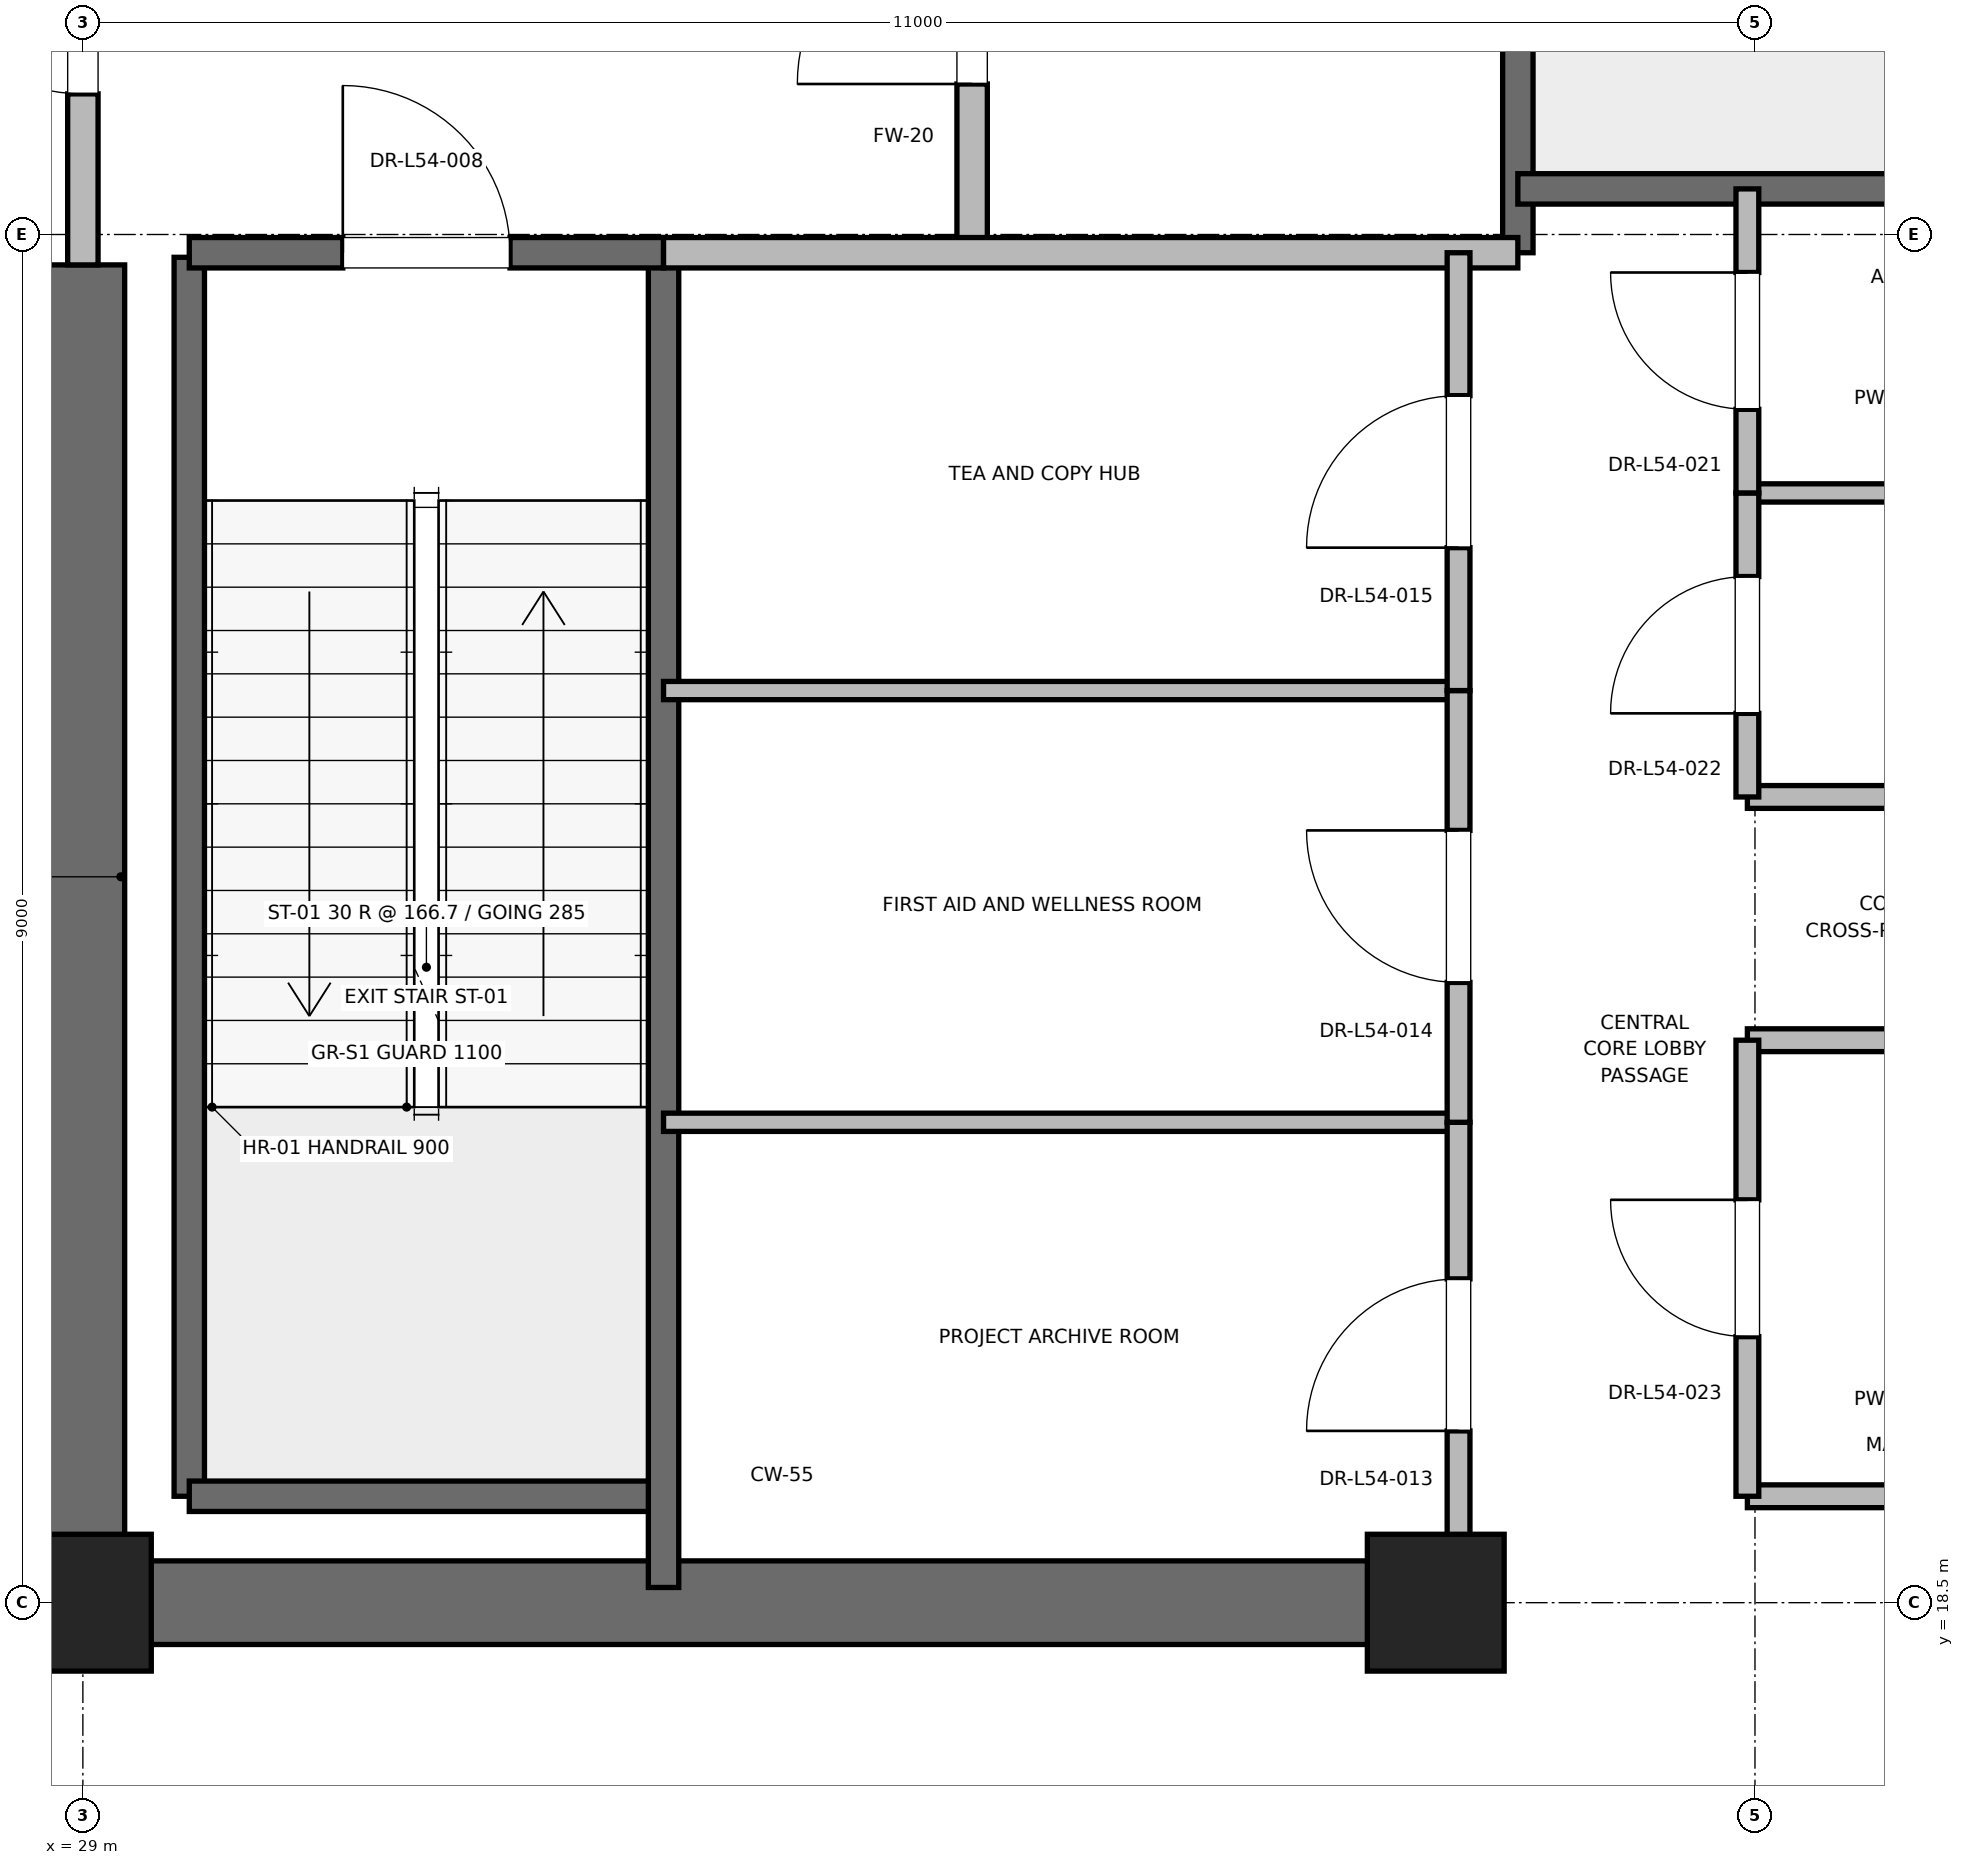
"""IFC4 building model, lengths in metres.
Left out: names, types, materials, properties, quantities, classifications, styles, units other than length and angle.
Written with IfcOpenShell. Run it as: python <this file> out.ifc"""

import sys

from ifc_helpers import new_model, si_unit, direction, frame, frame_2d, origin, origin_2d, place, context, subcontext, project, spatial, rectangle, extrude, element, fill, save


model = new_model("IFC4")
c1 = context("Model", 3, precision=1e-05, world=origin(), true_north=direction((0.0, 1.0)))
c2 = subcontext(c1, "Body", "Model", "MODEL_VIEW")
j1 = project(units=[si_unit("LENGTHUNIT", "METRE"), si_unit("PLANEANGLEUNIT", "RADIAN")], contexts=[c1])
p1 = place(None, origin())
s1 = spatial("IfcSite", under=j1, at=p1, CompositionType="ELEMENT")
p2 = place(p1, origin())
s2 = spatial("IfcBuilding", under=s1, at=p2, CompositionType="ELEMENT")
p3 = place(p2, frame((0.0, 0.0, 233.2)))
s3 = spatial("IfcBuildingStorey", under=s2, at=p3, CompositionType="ELEMENT", Elevation=233.2)
for number, where, z_axis, x_axis in (
    (1, (29.0, 18.5, 0.0), (0.0, 0.0, 1.0), (1.0, 0.0, 0.0)),
    (2, (37.9, 18.5, 0.0), (0.0, 0.0, 1.0), (1.0, 0.0, 0.0)),
):
    element("IfcColumn", number, at=place(p3, frame(where, z_axis=z_axis, x_axis=x_axis)), inside=s3, PredefinedType="PILASTER", context=c2, shape_type="SweptSolid", body=[
        extrude(rectangle(XDim=0.9, YDim=0.9, at=origin_2d()), origin(), (0.0, 0.0, 1.0), 5.0),
    ])
p4 = place(p3, frame((29.0, 18.5, 0.0), z_axis=(0.0, 0.0, 1.0), x_axis=(1.0, 0.0, 0.0)))
e3 = element("IfcWall", 3, at=p4, inside=s3, PredefinedType="SHEAR", context=c2, shape_type="SweptSolid", body=[
    extrude(rectangle(XDim=9.2, YDim=0.55, at=frame_2d((4.6, 0.0))), origin(), (0.0, 0.0, 1.0), 4.7),
])
p5 = place(p3, frame((29.0, 18.5, 0.0), z_axis=(0.0, 0.0, 1.0), x_axis=(0.0, 1.0, 0.0)))
e4 = element("IfcWall", 4, at=p5, inside=s3, PredefinedType="SHEAR", context=c2, shape_type="SweptSolid", body=[
    extrude(rectangle(XDim=8.8, YDim=0.55, at=frame_2d((4.4, 0.0))), origin(), (0.0, 0.0, 1.0), 4.7),
])
p6 = place(p3, frame((29.7, 19.2, 0.0), z_axis=(0.0, 0.0, 1.0), x_axis=(0.0, 1.0, 0.0)))
e5 = element("IfcWall", 5, at=p6, inside=s3, PredefinedType="SOLIDWALL", context=c2, shape_type="SweptSolid", body=[
    extrude(rectangle(XDim=8.15, YDim=0.2, at=frame_2d((4.075, 0.0))), origin(), (0.0, 0.0, 1.0), 4.7),
])
p7 = place(p3, frame((29.7, 19.2, 0.0), z_axis=(0.0, 0.0, 1.0), x_axis=(1.0, 0.0, 0.0)))
e6 = element("IfcWall", 6, at=p7, inside=s3, PredefinedType="SOLIDWALL", context=c2, shape_type="SweptSolid", body=[
    extrude(rectangle(XDim=3.12, YDim=0.2, at=frame_2d((1.56, 0.0))), origin(), (0.0, 0.0, 1.0), 4.7),
])
p8 = place(p3, frame((32.82, 18.6, 0.0), z_axis=(0.0, 0.0, 1.0), x_axis=(0.0, 1.0, 0.0)))
e7 = element("IfcWall", 7, at=p8, inside=s3, PredefinedType="SOLIDWALL", context=c2, shape_type="SweptSolid", body=[
    extrude(rectangle(XDim=8.78, YDim=0.2, at=frame_2d((4.39, 0.0))), origin(), (0.0, 0.0, 1.0), 4.7),
])
p9 = place(p3, frame((29.7, 27.38, 0.0), z_axis=(0.0, 0.0, 1.0), x_axis=(1.0, 0.0, 0.0)))
e8 = element("IfcWall", 8, at=p9, inside=s3, PredefinedType="SOLIDWALL", context=c2, shape_type="SweptSolid", body=[
    extrude(rectangle(XDim=3.12, YDim=0.2, at=frame_2d((1.56, 0.0))), origin(), (0.0, 0.0, 1.0), 4.7),
])
p10 = place(p9, frame((1.01, 0.0, 0.0)))
e9 = element("IfcOpeningElement", 9, at=p10, cuts=e8, PredefinedType="OPENING", context=c2, shape_type="SweptSolid", body=[
    extrude(rectangle(XDim=1.1, YDim=2.15, at=frame_2d((0.55, 1.075))), frame((0.0, 0.1, 0.0), z_axis=(0.0, -1.0, 0.0), x_axis=(1.0, 0.0, 0.0)), (0.0, 0.0, 1.0), 0.2),
])
p11 = place(p3, frame((38.44, 27.38, 0.0), z_axis=(0.0, 0.0, 1.0), x_axis=(0.0, 1.0, 0.0)))
e10 = element("IfcWall", 10, at=p11, inside=s3, PredefinedType="SOLIDWALL", context=c2, shape_type="SweptSolid", body=[
    extrude(rectangle(XDim=8.87, YDim=0.2, at=frame_2d((4.435, 0.0))), origin(), (0.0, 0.0, 1.0), 4.7),
])
p12 = place(p3, frame((38.44, 27.8, 0.0), z_axis=(0.0, 0.0, 1.0), x_axis=(1.0, 0.0, 0.0)))
e11 = element("IfcWall", 11, at=p12, inside=s3, PredefinedType="SOLIDWALL", context=c2, shape_type="SweptSolid", body=[
    extrude(rectangle(XDim=3.32, YDim=0.2, at=frame_2d((1.66, 0.0))), origin(), (0.0, 0.0, 1.0), 4.7),
])
p13 = place(p3, frame((34.85, 27.38, 0.0), z_axis=(0.0, 0.0, 1.0), x_axis=(0.0, 1.0, 0.0)))
e12 = element("IfcWall", 12, at=p13, inside=s3, PredefinedType="PARTITIONING", context=c2, shape_type="SweptSolid", body=[
    extrude(rectangle(XDim=3.37, YDim=0.2, at=frame_2d((1.685, 0.0))), origin(), (0.0, 0.0, 1.0), 4.7),
])
p14 = place(p13, frame((1.11, 0.0, 0.0)))
e13 = element("IfcOpeningElement", 13, at=p14, cuts=e12, PredefinedType="OPENING", context=c2, shape_type="SweptSolid", body=[
    extrude(rectangle(XDim=1.15, YDim=2.2, at=frame_2d((0.575, 1.1))), frame((0.0, 0.1, 0.0), z_axis=(0.0, -1.0, 0.0), x_axis=(1.0, 0.0, 0.0)), (0.0, 0.0, 1.0), 0.2),
])
p15 = place(p3, frame((29.0, 27.3, 0.0), z_axis=(0.0, 0.0, 1.0), x_axis=(0.0, 1.0, 0.0)))
e14 = element("IfcWall", 14, at=p15, inside=s3, PredefinedType="PARTITIONING", context=c2, shape_type="SweptSolid", body=[
    extrude(rectangle(XDim=3.4, YDim=0.2, at=frame_2d((1.7, 0.0))), origin(), (0.0, 0.0, 1.0), 3.68),
])
p16 = place(p15, frame((1.125, 0.0, 0.0)))
e15 = element("IfcOpeningElement", 15, at=p16, cuts=e14, PredefinedType="OPENING", context=c2, shape_type="SweptSolid", body=[
    extrude(rectangle(XDim=1.15, YDim=2.2, at=frame_2d((0.575, 1.1))), frame((0.0, 0.1, 0.0), z_axis=(0.0, -1.0, 0.0), x_axis=(1.0, 0.0, 0.0)), (0.0, 0.0, 1.0), 0.2),
])
p17 = place(p3, frame((32.82, 27.38, 0.0), z_axis=(0.0, 0.0, 1.0), x_axis=(1.0, 0.0, 0.0)))
e16 = element("IfcWall", 16, at=p17, inside=s3, PredefinedType="PARTITIONING", context=c2, shape_type="SweptSolid", body=[
    extrude(rectangle(XDim=5.62, YDim=0.2, at=frame_2d((2.81, 0.0))), origin(), (0.0, 0.0, 1.0), 4.7),
])
for number, where, z_axis, x_axis in (
    (17, (39.95, 19.2, 0.0), (0.0, 0.0, 1.0), (1.0, 0.0, 0.0)),
    (18, (39.95, 22.2, 0.0), (0.0, 0.0, 1.0), (1.0, 0.0, 0.0)),
    (19, (39.95, 23.8, 0.0), (0.0, 0.0, 1.0), (1.0, 0.0, 0.0)),
):
    element("IfcWall", number, at=place(p3, frame(where, z_axis=z_axis, x_axis=x_axis)), inside=s3, PredefinedType="PARTITIONING", context=c2, shape_type="SweptSolid", body=[
        extrude(rectangle(XDim=1.81, YDim=0.15, at=frame_2d((0.905, 0.0))), origin(), (0.0, 0.0, 1.0), 2.85),
    ])
p18 = place(p3, frame((39.95, 25.8, 0.0), z_axis=(0.0, 0.0, 1.0), x_axis=(1.0, 0.0, 0.0)))
e20 = element("IfcWall", 20, at=p18, inside=s3, PredefinedType="PARTITIONING", context=c2, shape_type="SweptSolid", body=[
    extrude(rectangle(XDim=1.81, YDim=0.12, at=frame_2d((0.905, 0.0))), origin(), (0.0, 0.0, 1.0), 2.85),
])
p19 = place(p3, frame((39.95, 19.2, 0.0), z_axis=(0.0, 0.0, 1.0), x_axis=(0.0, 1.0, 0.0)))
e21 = element("IfcWall", 21, at=p19, inside=s3, PredefinedType="PARTITIONING", context=c2, shape_type="SweptSolid", body=[
    extrude(rectangle(XDim=3.0, YDim=0.15, at=frame_2d((1.5, 0.0))), origin(), (0.0, 0.0, 1.0), 2.85),
])
p20 = place(p19, frame((1.05, 0.0, 0.0)))
e22 = element("IfcOpeningElement", 22, at=p20, cuts=e21, PredefinedType="OPENING", context=c2, shape_type="SweptSolid", body=[
    extrude(rectangle(XDim=0.9, YDim=2.1, at=frame_2d((0.45, 1.05))), frame((0.0, 0.075, 0.0), z_axis=(0.0, -1.0, 0.0), x_axis=(1.0, 0.0, 0.0)), (0.0, 0.0, 1.0), 0.15),
])
p21 = place(p3, frame((39.95, 23.8, 0.0), z_axis=(0.0, 0.0, 1.0), x_axis=(0.0, 1.0, 0.0)))
e23 = element("IfcWall", 23, at=p21, inside=s3, PredefinedType="PARTITIONING", context=c2, shape_type="SweptSolid", body=[
    extrude(rectangle(XDim=2.0, YDim=0.15, at=frame_2d((1.0, 0.0))), origin(), (0.0, 0.0, 1.0), 2.85),
])
p22 = place(p21, frame((0.55, 0.0, 0.0)))
e24 = element("IfcOpeningElement", 24, at=p22, cuts=e23, PredefinedType="OPENING", context=c2, shape_type="SweptSolid", body=[
    extrude(rectangle(XDim=0.9, YDim=2.1, at=frame_2d((0.45, 1.05))), frame((0.0, 0.075, 0.0), z_axis=(0.0, -1.0, 0.0), x_axis=(1.0, 0.0, 0.0)), (0.0, 0.0, 1.0), 0.15),
])
p23 = place(p3, frame((39.95, 25.8, 0.0), z_axis=(0.0, 0.0, 1.0), x_axis=(0.0, 1.0, 0.0)))
e25 = element("IfcWall", 25, at=p23, inside=s3, PredefinedType="PARTITIONING", context=c2, shape_type="SweptSolid", body=[
    extrude(rectangle(XDim=2.0, YDim=0.15, at=frame_2d((1.0, 0.0))), origin(), (0.0, 0.0, 1.0), 2.85),
])
p24 = place(p23, frame((0.55, 0.0, 0.0)))
e26 = element("IfcOpeningElement", 26, at=p24, cuts=e25, PredefinedType="OPENING", context=c2, shape_type="SweptSolid", body=[
    extrude(rectangle(XDim=0.9, YDim=2.1, at=frame_2d((0.45, 1.05))), frame((0.0, 0.075, 0.0), z_axis=(0.0, -1.0, 0.0), x_axis=(1.0, 0.0, 0.0)), (0.0, 0.0, 1.0), 0.15),
])
for number, where, z_axis, x_axis in (
    (27, (32.82, 21.66, 0.0), (0.0, 0.0, 1.0), (1.0, 0.0, 0.0)),
    (28, (32.82, 24.5, 0.0), (0.0, 0.0, 1.0), (1.0, 0.0, 0.0)),
):
    element("IfcWall", number, at=place(p3, frame(where, z_axis=z_axis, x_axis=x_axis)), inside=s3, PredefinedType="PARTITIONING", context=c2, shape_type="SweptSolid", body=[
        extrude(rectangle(XDim=5.23, YDim=0.12, at=frame_2d((2.615, 0.0))), origin(), (0.0, 0.0, 1.0), 2.85),
    ])
p25 = place(p3, frame((38.05, 18.6, 0.0), z_axis=(0.0, 0.0, 1.0), x_axis=(0.0, 1.0, 0.0)))
e29 = element("IfcWall", 29, at=p25, inside=s3, PredefinedType="PARTITIONING", context=c2, shape_type="SweptSolid", body=[
    extrude(rectangle(XDim=3.06, YDim=0.15, at=frame_2d((1.53, 0.0))), origin(), (0.0, 0.0, 1.0), 2.85),
])
p26 = place(p25, frame((1.03, 0.0, 0.0)))
e30 = element("IfcOpeningElement", 30, at=p26, cuts=e29, PredefinedType="OPENING", context=c2, shape_type="SweptSolid", body=[
    extrude(rectangle(XDim=1.0, YDim=2.15, at=frame_2d((0.5, 1.075))), frame((0.0, 0.075, 0.0), z_axis=(0.0, -1.0, 0.0), x_axis=(1.0, 0.0, 0.0)), (0.0, 0.0, 1.0), 0.15),
])
p27 = place(p3, frame((38.05, 21.66, 0.0), z_axis=(0.0, 0.0, 1.0), x_axis=(0.0, 1.0, 0.0)))
e31 = element("IfcWall", 31, at=p27, inside=s3, PredefinedType="PARTITIONING", context=c2, shape_type="SweptSolid", body=[
    extrude(rectangle(XDim=2.84, YDim=0.15, at=frame_2d((1.42, 0.0))), origin(), (0.0, 0.0, 1.0), 2.85),
])
p28 = place(p27, frame((0.92, 0.0, 0.0)))
e32 = element("IfcOpeningElement", 32, at=p28, cuts=e31, PredefinedType="OPENING", context=c2, shape_type="SweptSolid", body=[
    extrude(rectangle(XDim=1.0, YDim=2.15, at=frame_2d((0.5, 1.075))), frame((0.0, 0.075, 0.0), z_axis=(0.0, -1.0, 0.0), x_axis=(1.0, 0.0, 0.0)), (0.0, 0.0, 1.0), 0.15),
])
p29 = place(p3, frame((38.05, 24.5, 0.0), z_axis=(0.0, 0.0, 1.0), x_axis=(0.0, 1.0, 0.0)))
e33 = element("IfcWall", 33, at=p29, inside=s3, PredefinedType="PARTITIONING", context=c2, shape_type="SweptSolid", body=[
    extrude(rectangle(XDim=2.88, YDim=0.15, at=frame_2d((1.44, 0.0))), origin(), (0.0, 0.0, 1.0), 2.85),
])
p30 = place(p29, frame((0.94, 0.0, 0.0)))
e34 = element("IfcOpeningElement", 34, at=p30, cuts=e33, PredefinedType="OPENING", context=c2, shape_type="SweptSolid", body=[
    extrude(rectangle(XDim=1.0, YDim=2.15, at=frame_2d((0.5, 1.075))), frame((0.0, 0.075, 0.0), z_axis=(0.0, -1.0, 0.0), x_axis=(1.0, 0.0, 0.0)), (0.0, 0.0, 1.0), 0.15),
])
p31 = place(p10, origin())
e35 = element("IfcDoor", 35, at=p31, inside=s3, OperationType="SINGLE_SWING_LEFT", PredefinedType="DOOR", context=c2, shape_type="SweptSolid", body=[
    extrude(rectangle(XDim=1.1, YDim=2.15, at=frame_2d((0.55, 1.075))), frame((0.0, 0.025, 0.0), z_axis=(0.0, -1.0, 0.0), x_axis=(1.0, 0.0, 0.0)), (0.0, 0.0, 1.0), 0.05),
])
fill(e9, e35)
p32 = place(p14, origin())
e36 = element("IfcDoor", 36, at=p32, inside=s3, OperationType="SINGLE_SWING_LEFT", PredefinedType="DOOR", context=c2, shape_type="SweptSolid", body=[
    extrude(rectangle(XDim=1.15, YDim=2.2, at=frame_2d((0.575, 1.1))), frame((0.0, 0.025, 0.0), z_axis=(0.0, -1.0, 0.0), x_axis=(1.0, 0.0, 0.0)), (0.0, 0.0, 1.0), 0.05),
])
fill(e13, e36)
p33 = place(p16, origin())
e37 = element("IfcDoor", 37, at=p33, inside=s3, OperationType="SINGLE_SWING_RIGHT", PredefinedType="DOOR", context=c2, shape_type="SweptSolid", body=[
    extrude(rectangle(XDim=1.15, YDim=2.2, at=frame_2d((0.575, 1.1))), frame((0.0, 0.025, 0.0), z_axis=(0.0, -1.0, 0.0), x_axis=(1.0, 0.0, 0.0)), (0.0, 0.0, 1.0), 0.05),
])
fill(e15, e37)
p34 = place(p20, origin())
e38 = element("IfcDoor", 38, at=p34, inside=s3, OperationType="SINGLE_SWING_RIGHT", PredefinedType="DOOR", context=c2, shape_type="SweptSolid", body=[
    extrude(rectangle(XDim=0.9, YDim=2.1, at=frame_2d((0.45, 1.05))), frame((0.0, 0.025, 0.0), z_axis=(0.0, -1.0, 0.0), x_axis=(1.0, 0.0, 0.0)), (0.0, 0.0, 1.0), 0.05),
])
fill(e22, e38)
p35 = place(p22, origin())
e39 = element("IfcDoor", 39, at=p35, inside=s3, OperationType="SINGLE_SWING_LEFT", PredefinedType="DOOR", context=c2, shape_type="SweptSolid", body=[
    extrude(rectangle(XDim=0.9, YDim=2.1, at=frame_2d((0.45, 1.05))), frame((0.0, 0.025, 0.0), z_axis=(0.0, -1.0, 0.0), x_axis=(1.0, 0.0, 0.0)), (0.0, 0.0, 1.0), 0.05),
])
fill(e24, e39)
p36 = place(p24, origin())
e40 = element("IfcDoor", 40, at=p36, inside=s3, OperationType="SINGLE_SWING_RIGHT", PredefinedType="DOOR", context=c2, shape_type="SweptSolid", body=[
    extrude(rectangle(XDim=0.9, YDim=2.1, at=frame_2d((0.45, 1.05))), frame((0.0, 0.025, 0.0), z_axis=(0.0, -1.0, 0.0), x_axis=(1.0, 0.0, 0.0)), (0.0, 0.0, 1.0), 0.05),
])
fill(e26, e40)
p37 = place(p26, origin())
e41 = element("IfcDoor", 41, at=p37, inside=s3, OperationType="SINGLE_SWING_LEFT", PredefinedType="DOOR", context=c2, shape_type="SweptSolid", body=[
    extrude(rectangle(XDim=1.0, YDim=2.15, at=frame_2d((0.5, 1.075))), frame((0.0, 0.025, 0.0), z_axis=(0.0, -1.0, 0.0), x_axis=(1.0, 0.0, 0.0)), (0.0, 0.0, 1.0), 0.05),
])
fill(e30, e41)
p38 = place(p28, origin())
e42 = element("IfcDoor", 42, at=p38, inside=s3, OperationType="SINGLE_SWING_RIGHT", PredefinedType="DOOR", context=c2, shape_type="SweptSolid", body=[
    extrude(rectangle(XDim=1.0, YDim=2.15, at=frame_2d((0.5, 1.075))), frame((0.0, 0.025, 0.0), z_axis=(0.0, -1.0, 0.0), x_axis=(1.0, 0.0, 0.0)), (0.0, 0.0, 1.0), 0.05),
])
fill(e32, e42)
p39 = place(p30, origin())
e43 = element("IfcDoor", 43, at=p39, inside=s3, OperationType="SINGLE_SWING_LEFT", PredefinedType="DOOR", context=c2, shape_type="SweptSolid", body=[
    extrude(rectangle(XDim=1.0, YDim=2.15, at=frame_2d((0.5, 1.075))), frame((0.0, 0.025, 0.0), z_axis=(0.0, -1.0, 0.0), x_axis=(1.0, 0.0, 0.0)), (0.0, 0.0, 1.0), 0.05),
])
fill(e34, e43)
save(model, sys.argv[1])
